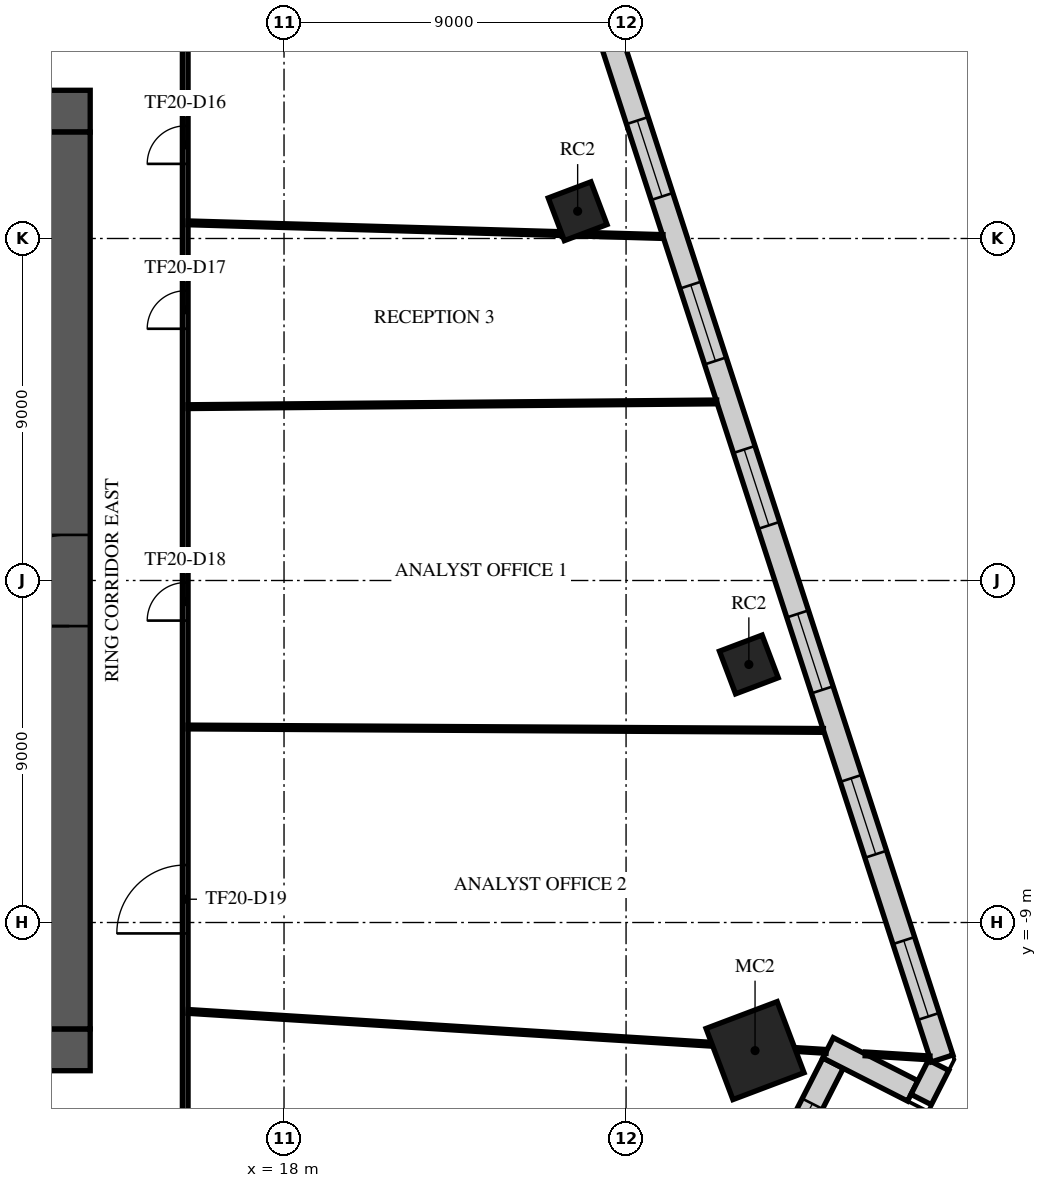
"""IFC4 building model, lengths in metres.
Left out: names, types, materials, properties, quantities, classifications, styles, units other than length and angle.
Written with IfcOpenShell. Run it as: python <this file> out.ifc"""

import sys

from ifc_helpers import new_model, si_unit, direction, frame, frame_2d, origin, origin_2d, place, context, subcontext, project, spatial, rectangle, extrude, element, fill, save


model = new_model("IFC4")
c1 = context("Model", 3, precision=1e-05, world=origin(), true_north=direction((0.0, 1.0)))
c2 = subcontext(c1, "Body", "Model", "MODEL_VIEW")
j1 = project(units=[si_unit("LENGTHUNIT", "METRE"), si_unit("PLANEANGLEUNIT", "RADIAN")], contexts=[c1])
p1 = place(None, origin())
s1 = spatial("IfcSite", under=j1, at=p1, CompositionType="ELEMENT")
p2 = place(p1, origin())
s2 = spatial("IfcBuilding", under=s1, at=p2, CompositionType="ELEMENT")
p3 = place(p2, frame((0.0, 0.0, 90.1)))
s3 = spatial("IfcBuildingStorey", under=s2, at=p3, CompositionType="ELEMENT", Elevation=90.1)
p4 = place(p3, frame((30.394, -12.371, 0.0), z_axis=(0.0, 0.0, 1.0), x_axis=(0.935491525991, 0.353349125935, 0.0)))
e1 = element("IfcColumn", 1, at=p4, inside=s3, PredefinedType="COLUMN", context=c2, shape_type="SweptSolid", body=[
    extrude(rectangle(XDim=2.0, YDim=2.0, at=origin_2d()), origin(), (0.0, 0.0, 1.0), 4.0),
])
for number, where, z_axis, x_axis in (
    (2, (30.231, -2.21, 0.0), (0.0, 0.0, 1.0), (0.935, 0.353, 0.0)),
    (3, (25.726, 9.717, 0.0), (0.0, 0.0, 1.0), (0.935, 0.353, 0.0)),
):
    element("IfcColumn", number, at=place(p3, frame(where, z_axis=z_axis, x_axis=x_axis)), inside=s3, PredefinedType="COLUMN", context=c2, shape_type="SweptSolid", body=[
        extrude(rectangle(XDim=1.2, YDim=1.2, at=origin_2d()), origin(), (0.0, 0.0, 1.0), 4.0),
    ])
p5 = place(p3, frame((-12.9, 12.35, 0.0), z_axis=(0.0, 0.0, 1.0), x_axis=(1.0, 0.0, 0.0)))
e4 = element("IfcWall", 4, at=p5, inside=s3, PredefinedType="SHEAR", context=c2, shape_type="SweptSolid", body=[
    extrude(rectangle(XDim=25.8, YDim=1.1, at=frame_2d((12.9, 0.0))), origin(), (0.0, 0.0, 1.0), 3.58),
])
p6 = place(p5, frame((11.7, 0.0, 0.0)))
e5 = element("IfcOpeningElement", 5, at=p6, cuts=e4, PredefinedType="OPENING", context=c2, shape_type="SweptSolid", body=[
    extrude(rectangle(XDim=2.4, YDim=2.4, at=frame_2d((1.2, 1.2))), frame((0.0, 0.56, 0.0), z_axis=(0.0, -1.0, 0.0), x_axis=(1.0, 0.0, 0.0)), (0.0, 0.0, 1.0), 1.12),
])
p7 = place(p5, frame((22.525, 0.0, 0.0)))
e6 = element("IfcOpeningElement", 6, at=p7, cuts=e4, PredefinedType="OPENING", context=c2, shape_type="SweptSolid", body=[
    extrude(rectangle(XDim=1.2, YDim=2.1, at=frame_2d((0.6, 1.05))), frame((0.0, 0.56, 0.0), z_axis=(0.0, -1.0, 0.0), x_axis=(1.0, 0.0, 0.0)), (0.0, 0.0, 1.0), 1.12),
])
p8 = place(p5, frame((1.5, 0.0, 0.0)))
e7 = element("IfcOpeningElement", 7, at=p8, cuts=e4, PredefinedType="OPENING", context=c2, shape_type="SweptSolid", body=[
    extrude(rectangle(XDim=1.0, YDim=2.1, at=frame_2d((0.5, 1.05))), frame((0.0, 0.56, 0.0), z_axis=(0.0, -1.0, 0.0), x_axis=(1.0, 0.0, 0.0)), (0.0, 0.0, 1.0), 1.12),
])
p9 = place(p3, frame((-12.9, -12.35, 0.0), z_axis=(0.0, 0.0, 1.0), x_axis=(1.0, 0.0, 0.0)))
e8 = element("IfcWall", 8, at=p9, inside=s3, PredefinedType="SHEAR", context=c2, shape_type="SweptSolid", body=[
    extrude(rectangle(XDim=25.8, YDim=1.1, at=frame_2d((12.9, 0.0))), origin(), (0.0, 0.0, 1.0), 3.58),
])
p10 = place(p9, frame((7.8, 0.0, 0.0)))
e9 = element("IfcOpeningElement", 9, at=p10, cuts=e8, PredefinedType="OPENING", context=c2, shape_type="SweptSolid", body=[
    extrude(rectangle(XDim=2.0, YDim=2.1, at=frame_2d((1.0, 1.05))), frame((0.0, 0.56, 0.0), z_axis=(0.0, -1.0, 0.0), x_axis=(1.0, 0.0, 0.0)), (0.0, 0.0, 1.0), 1.12),
])
p11 = place(p9, frame((17.925, 0.0, 0.0)))
e10 = element("IfcOpeningElement", 10, at=p11, cuts=e8, PredefinedType="OPENING", context=c2, shape_type="SweptSolid", body=[
    extrude(rectangle(XDim=1.2, YDim=2.1, at=frame_2d((0.6, 1.05))), frame((0.0, 0.56, 0.0), z_axis=(0.0, -1.0, 0.0), x_axis=(1.0, 0.0, 0.0)), (0.0, 0.0, 1.0), 1.12),
])
p12 = place(p9, frame((2.075, 0.0, 0.0)))
e11 = element("IfcOpeningElement", 11, at=p12, cuts=e8, PredefinedType="OPENING", context=c2, shape_type="SweptSolid", body=[
    extrude(rectangle(XDim=1.2, YDim=2.1, at=frame_2d((0.6, 1.05))), frame((0.0, 0.56, 0.0), z_axis=(0.0, -1.0, 0.0), x_axis=(1.0, 0.0, 0.0)), (0.0, 0.0, 1.0), 1.12),
])
p13 = place(p9, frame((22.525, 0.0, 0.0)))
e12 = element("IfcOpeningElement", 12, at=p13, cuts=e8, PredefinedType="OPENING", context=c2, shape_type="SweptSolid", body=[
    extrude(rectangle(XDim=1.2, YDim=2.1, at=frame_2d((0.6, 1.05))), frame((0.0, 0.56, 0.0), z_axis=(0.0, -1.0, 0.0), x_axis=(1.0, 0.0, 0.0)), (0.0, 0.0, 1.0), 1.12),
])
p14 = place(p3, frame((12.35, -11.8, 0.0), z_axis=(0.0, 0.0, 1.0), x_axis=(0.0, 1.0, 0.0)))
e13 = element("IfcWall", 13, at=p14, inside=s3, PredefinedType="SHEAR", context=c2, shape_type="SweptSolid", body=[
    extrude(rectangle(XDim=23.6, YDim=1.1, at=frame_2d((11.8, 0.0))), origin(), (0.0, 0.0, 1.0), 3.58),
])
p15 = place(p14, frame((10.6, 0.0, 0.0)))
e14 = element("IfcOpeningElement", 14, at=p15, cuts=e13, PredefinedType="OPENING", context=c2, shape_type="SweptSolid", body=[
    extrude(rectangle(XDim=2.4, YDim=2.4, at=frame_2d((1.2, 1.2))), frame((0.0, 0.56, 0.0), z_axis=(0.0, -1.0, 0.0), x_axis=(1.0, 0.0, 0.0)), (0.0, 0.0, 1.0), 1.12),
])
p16 = place(p3, frame((30.631, -16.265, 0.0), z_axis=(0.0, 0.0, 1.0), x_axis=(0.454011719911, 0.890995711653, 0.0)))
e15 = element("IfcWall", 15, at=p16, inside=s3, PredefinedType="STANDARD", context=c2, shape_type="SweptSolid", body=[
    extrude(rectangle(XDim=4.0, YDim=0.6, at=frame_2d((2.0, 0.0))), origin(), (0.0, 0.0, 1.0), 3.58),
])
p17 = place(p16, frame((1.2, 0.0, 0.9)))
e16 = element("IfcOpeningElement", 16, at=p17, cuts=e15, PredefinedType="OPENING", context=c2, shape_type="SweptSolid", body=[
    extrude(rectangle(XDim=1.6, YDim=2.1, at=frame_2d((0.8, 1.05))), frame((0.0, 0.31, 0.0), z_axis=(0.0, -1.0, 0.0), x_axis=(1.0, 0.0, 0.0)), (0.0, 0.0, 1.0), 0.62),
])
p18 = place(p3, frame((32.316, -12.297, 0.0), z_axis=(0.0, 0.0, 1.0), x_axis=(0.891023102287, -0.453957961921, 0.0)))
e17 = element("IfcWall", 17, at=p18, inside=s3, PredefinedType="STANDARD", context=c2, shape_type="SweptSolid", body=[
    extrude(rectangle(XDim=2.5, YDim=0.6, at=frame_2d((1.25, 0.0))), origin(), (0.0, 0.0, 1.0), 3.58),
])
p19 = place(p3, frame((34.765, -13.658, 0.0), z_axis=(0.0, 0.0, 1.0), x_axis=(0.454055955632, 0.890973169717, 0.0)))
e18 = element("IfcWall", 18, at=p19, inside=s3, PredefinedType="STANDARD", context=c2, shape_type="SweptSolid", body=[
    extrude(rectangle(XDim=1.011, YDim=0.6, at=frame_2d((0.506, 0.0))), origin(), (0.0, 0.0, 1.0), 3.58),
])
p20 = place(p3, frame((35.315, -12.578, 0.0), z_axis=(0.0, 0.0, 1.0), x_axis=(-0.30901806374, 0.951056168837, 0.0)))
e19 = element("IfcWall", 19, at=p20, inside=s3, PredefinedType="STANDARD", context=c2, shape_type="SweptSolid", body=[
    extrude(rectangle(XDim=45.376, YDim=0.6, at=frame_2d((22.688, 0.0))), origin(), (0.0, 0.0, 1.0), 3.58),
])
p21 = place(p20, frame((1.163, 0.0, 0.9)))
e20 = element("IfcOpeningElement", 20, at=p21, cuts=e19, PredefinedType="OPENING", context=c2, shape_type="SweptSolid", body=[
    extrude(rectangle(XDim=2.1, YDim=2.1, at=frame_2d((1.05, 1.05))), frame((0.0, 0.31, 0.0), z_axis=(0.0, -1.0, 0.0), x_axis=(1.0, 0.0, 0.0)), (0.0, 0.0, 1.0), 0.62),
])
p22 = place(p20, frame((5.651, 0.0, 0.9)))
e21 = element("IfcOpeningElement", 21, at=p22, cuts=e19, PredefinedType="OPENING", context=c2, shape_type="SweptSolid", body=[
    extrude(rectangle(XDim=2.1, YDim=2.1, at=frame_2d((1.05, 1.05))), frame((0.0, 0.31, 0.0), z_axis=(0.0, -1.0, 0.0), x_axis=(1.0, 0.0, 0.0)), (0.0, 0.0, 1.0), 0.62),
])
p23 = place(p20, frame((10.201, 0.0, 0.9)))
e22 = element("IfcOpeningElement", 22, at=p23, cuts=e19, PredefinedType="OPENING", context=c2, shape_type="SweptSolid", body=[
    extrude(rectangle(XDim=2.1, YDim=2.1, at=frame_2d((1.05, 1.05))), frame((0.0, 0.31, 0.0), z_axis=(0.0, -1.0, 0.0), x_axis=(1.0, 0.0, 0.0)), (0.0, 0.0, 1.0), 0.62),
])
p24 = place(p20, frame((14.751, 0.0, 0.9)))
e23 = element("IfcOpeningElement", 23, at=p24, cuts=e19, PredefinedType="OPENING", context=c2, shape_type="SweptSolid", body=[
    extrude(rectangle(XDim=2.1, YDim=2.1, at=frame_2d((1.05, 1.05))), frame((0.0, 0.31, 0.0), z_axis=(0.0, -1.0, 0.0), x_axis=(1.0, 0.0, 0.0)), (0.0, 0.0, 1.0), 0.62),
])
p25 = place(p20, frame((19.301, 0.0, 0.9)))
e24 = element("IfcOpeningElement", 24, at=p25, cuts=e19, PredefinedType="OPENING", context=c2, shape_type="SweptSolid", body=[
    extrude(rectangle(XDim=2.1, YDim=2.1, at=frame_2d((1.05, 1.05))), frame((0.0, 0.31, 0.0), z_axis=(0.0, -1.0, 0.0), x_axis=(1.0, 0.0, 0.0)), (0.0, 0.0, 1.0), 0.62),
])
p26 = place(p20, frame((23.851, 0.0, 0.9)))
e25 = element("IfcOpeningElement", 25, at=p26, cuts=e19, PredefinedType="OPENING", context=c2, shape_type="SweptSolid", body=[
    extrude(rectangle(XDim=2.1, YDim=2.1, at=frame_2d((1.05, 1.05))), frame((0.0, 0.31, 0.0), z_axis=(0.0, -1.0, 0.0), x_axis=(1.0, 0.0, 0.0)), (0.0, 0.0, 1.0), 0.62),
])
p27 = place(p20, frame((28.401, 0.0, 0.9)))
e26 = element("IfcOpeningElement", 26, at=p27, cuts=e19, PredefinedType="OPENING", context=c2, shape_type="SweptSolid", body=[
    extrude(rectangle(XDim=2.1, YDim=2.1, at=frame_2d((1.05, 1.05))), frame((0.0, 0.31, 0.0), z_axis=(0.0, -1.0, 0.0), x_axis=(1.0, 0.0, 0.0)), (0.0, 0.0, 1.0), 0.62),
])
p28 = place(p20, frame((32.951, 0.0, 0.9)))
e27 = element("IfcOpeningElement", 27, at=p28, cuts=e19, PredefinedType="OPENING", context=c2, shape_type="SweptSolid", body=[
    extrude(rectangle(XDim=2.1, YDim=2.1, at=frame_2d((1.05, 1.05))), frame((0.0, 0.31, 0.0), z_axis=(0.0, -1.0, 0.0), x_axis=(1.0, 0.0, 0.0)), (0.0, 0.0, 1.0), 0.62),
])
p29 = place(p20, frame((37.501, 0.0, 0.9)))
e28 = element("IfcOpeningElement", 28, at=p29, cuts=e19, PredefinedType="OPENING", context=c2, shape_type="SweptSolid", body=[
    extrude(rectangle(XDim=2.1, YDim=2.1, at=frame_2d((1.05, 1.05))), frame((0.0, 0.31, 0.0), z_axis=(0.0, -1.0, 0.0), x_axis=(1.0, 0.0, 0.0)), (0.0, 0.0, 1.0), 0.62),
])
p30 = place(p20, frame((42.051, 0.0, 0.9)))
e29 = element("IfcOpeningElement", 29, at=p30, cuts=e19, PredefinedType="OPENING", context=c2, shape_type="SweptSolid", body=[
    extrude(rectangle(XDim=2.1, YDim=2.1, at=frame_2d((1.05, 1.05))), frame((0.0, 0.31, 0.0), z_axis=(0.0, -1.0, 0.0), x_axis=(1.0, 0.0, 0.0)), (0.0, 0.0, 1.0), 0.62),
])
p31 = place(p3, frame((15.4, -15.325, 0.0), z_axis=(0.0, 0.0, 1.0), x_axis=(0.0, 1.0, 0.0)))
e30 = element("IfcWall", 30, at=p31, inside=s3, PredefinedType="PARTITIONING", context=c2, shape_type="SweptSolid", body=[
    extrude(rectangle(XDim=30.65, YDim=0.15, at=frame_2d((15.325, 0.0))), origin(), (0.0, 0.0, 1.0), 3.08),
])
p32 = place(p31, frame((26.288, 0.0, 0.0)))
e31 = element("IfcOpeningElement", 31, at=p32, cuts=e30, PredefinedType="OPENING", context=c2, shape_type="SweptSolid", body=[
    extrude(rectangle(XDim=1.0, YDim=2.1, at=frame_2d((0.5, 1.05))), frame((0.0, 0.085, 0.0), z_axis=(0.0, -1.0, 0.0), x_axis=(1.0, 0.0, 0.0)), (0.0, 0.0, 1.0), 0.17),
])
p33 = place(p31, frame((21.949, 0.0, 0.0)))
e32 = element("IfcOpeningElement", 32, at=p33, cuts=e30, PredefinedType="OPENING", context=c2, shape_type="SweptSolid", body=[
    extrude(rectangle(XDim=1.0, YDim=2.1, at=frame_2d((0.5, 1.05))), frame((0.0, 0.085, 0.0), z_axis=(0.0, -1.0, 0.0), x_axis=(1.0, 0.0, 0.0)), (0.0, 0.0, 1.0), 0.17),
])
p34 = place(p31, frame((14.27, 0.0, 0.0)))
e33 = element("IfcOpeningElement", 33, at=p34, cuts=e30, PredefinedType="OPENING", context=c2, shape_type="SweptSolid", body=[
    extrude(rectangle(XDim=1.0, YDim=2.1, at=frame_2d((0.5, 1.05))), frame((0.0, 0.085, 0.0), z_axis=(0.0, -1.0, 0.0), x_axis=(1.0, 0.0, 0.0)), (0.0, 0.0, 1.0), 0.17),
])
p35 = place(p31, frame((6.038, 0.0, 0.0)))
e34 = element("IfcOpeningElement", 34, at=p35, cuts=e30, PredefinedType="OPENING", context=c2, shape_type="SweptSolid", body=[
    extrude(rectangle(XDim=1.8, YDim=2.1, at=frame_2d((0.9, 1.05))), frame((0.0, 0.085, 0.0), z_axis=(0.0, -1.0, 0.0), x_axis=(1.0, 0.0, 0.0)), (0.0, 0.0, 1.0), 0.17),
])
p36 = place(p3, frame((15.478, -11.34, 0.0), z_axis=(0.0, 0.0, 1.0), x_axis=(0.998040108865, -0.062577480745, 0.0)))
e35 = element("IfcWall", 35, at=p36, inside=s3, PredefinedType="PARTITIONING", context=c2, shape_type="SweptSolid", body=[
    extrude(rectangle(XDim=13.811, YDim=0.1, at=frame_2d((6.906, 0.0))), origin(), (0.0, 0.0, 1.0), 2.96),
])
p37 = place(p3, frame((15.475, -3.855, 0.0), z_axis=(0.0, 0.0, 1.0), x_axis=(0.999985480582, -0.005388749797, 0.0)))
e36 = element("IfcWall", 36, at=p37, inside=s3, PredefinedType="PARTITIONING", context=c2, shape_type="SweptSolid", body=[
    extrude(rectangle(XDim=16.718, YDim=0.1, at=frame_2d((8.359, 0.0))), origin(), (0.0, 0.0, 1.0), 2.83),
])
p38 = place(p3, frame((15.475, 4.575, 0.0), z_axis=(0.0, 0.0, 1.0), x_axis=(0.99995993254, 0.008951721355, 0.0)))
e37 = element("IfcWall", 37, at=p38, inside=s3, PredefinedType="PARTITIONING", context=c2, shape_type="SweptSolid", body=[
    extrude(rectangle(XDim=13.909, YDim=0.1, at=frame_2d((6.955, 0.0))), origin(), (0.0, 0.0, 1.0), 2.83),
])
p39 = place(p3, frame((15.476, 9.412, 0.0), z_axis=(0.0, 0.0, 1.0), x_axis=(0.999583865111, -0.028846084817, 0.0)))
e38 = element("IfcWall", 38, at=p39, inside=s3, PredefinedType="PARTITIONING", context=c2, shape_type="SweptSolid", body=[
    extrude(rectangle(XDim=9.835, YDim=0.1, at=frame_2d((4.917, 0.0))), origin(), (0.0, 0.0, 1.0), 2.96),
])
p40 = place(p3, frame((25.826, 9.113, 0.0), z_axis=(0.0, 0.0, 1.0), x_axis=(0.999585375356, -0.028793703742, 0.0)))
e39 = element("IfcWall", 39, at=p40, inside=s3, PredefinedType="PARTITIONING", context=c2, shape_type="SweptSolid", body=[
    extrude(rectangle(XDim=2.145, YDim=0.1, at=frame_2d((1.073, 0.0))), origin(), (0.0, 0.0, 1.0), 2.83),
])
p41 = place(p3, frame((31.452, -12.342, 0.0), z_axis=(0.0, 0.0, 1.0), x_axis=(0.998038567495, -0.062602059006, 0.0)))
e40 = element("IfcWall", 40, at=p41, inside=s3, PredefinedType="PARTITIONING", context=c2, shape_type="SweptSolid", body=[
    extrude(rectangle(XDim=0.815, YDim=0.1, at=frame_2d((0.408, 0.0))), origin(), (0.0, 0.0, 1.0), 3.58),
])
p42 = place(p3, frame((33.295, -12.457, 0.0), z_axis=(0.0, 0.0, 1.0), x_axis=(0.998041396796, -0.062556936314, 0.0)))
e41 = element("IfcWall", 41, at=p42, inside=s3, PredefinedType="PARTITIONING", context=c2, shape_type="SweptSolid", body=[
    extrude(rectangle(XDim=1.702, YDim=0.1, at=frame_2d((0.851, 0.0))), origin(), (0.0, 0.0, 1.0), 3.58),
])
p43 = place(p15, origin())
e42 = element("IfcDoor", 42, at=p43, inside=s3, OperationType="SINGLE_SWING_LEFT", PredefinedType="DOOR", context=c2, shape_type="SweptSolid", body=[
    extrude(rectangle(XDim=2.4, YDim=2.4, at=frame_2d((1.2, 1.2))), frame((0.0, 0.025, 0.0), z_axis=(0.0, -1.0, 0.0), x_axis=(1.0, 0.0, 0.0)), (0.0, 0.0, 1.0), 0.05),
])
fill(e14, e42)
p44 = place(p17, origin())
e43 = element("IfcWindow", 43, at=p44, inside=s3, PartitioningType="SINGLE_PANEL", PredefinedType="WINDOW", context=c2, shape_type="SweptSolid", body=[
    extrude(rectangle(XDim=1.6, YDim=2.1, at=frame_2d((0.8, 1.05))), frame((0.0, 0.03, 0.0), z_axis=(0.0, -1.0, 0.0), x_axis=(1.0, 0.0, 0.0)), (0.0, 0.0, 1.0), 0.06),
])
fill(e16, e43)
p45 = place(p21, origin())
e44 = element("IfcWindow", 44, at=p45, inside=s3, PartitioningType="SINGLE_PANEL", PredefinedType="WINDOW", context=c2, shape_type="SweptSolid", body=[
    extrude(rectangle(XDim=2.1, YDim=2.1, at=frame_2d((1.05, 1.05))), frame((0.0, 0.03, 0.0), z_axis=(0.0, -1.0, 0.0), x_axis=(1.0, 0.0, 0.0)), (0.0, 0.0, 1.0), 0.06),
])
fill(e20, e44)
p46 = place(p22, origin())
e45 = element("IfcWindow", 45, at=p46, inside=s3, PartitioningType="SINGLE_PANEL", PredefinedType="WINDOW", context=c2, shape_type="SweptSolid", body=[
    extrude(rectangle(XDim=2.1, YDim=2.1, at=frame_2d((1.05, 1.05))), frame((0.0, 0.03, 0.0), z_axis=(0.0, -1.0, 0.0), x_axis=(1.0, 0.0, 0.0)), (0.0, 0.0, 1.0), 0.06),
])
fill(e21, e45)
p47 = place(p23, origin())
e46 = element("IfcWindow", 46, at=p47, inside=s3, PartitioningType="SINGLE_PANEL", PredefinedType="WINDOW", context=c2, shape_type="SweptSolid", body=[
    extrude(rectangle(XDim=2.1, YDim=2.1, at=frame_2d((1.05, 1.05))), frame((0.0, 0.03, 0.0), z_axis=(0.0, -1.0, 0.0), x_axis=(1.0, 0.0, 0.0)), (0.0, 0.0, 1.0), 0.06),
])
fill(e22, e46)
p48 = place(p24, origin())
e47 = element("IfcWindow", 47, at=p48, inside=s3, PartitioningType="SINGLE_PANEL", PredefinedType="WINDOW", context=c2, shape_type="SweptSolid", body=[
    extrude(rectangle(XDim=2.1, YDim=2.1, at=frame_2d((1.05, 1.05))), frame((0.0, 0.03, 0.0), z_axis=(0.0, -1.0, 0.0), x_axis=(1.0, 0.0, 0.0)), (0.0, 0.0, 1.0), 0.06),
])
fill(e23, e47)
p49 = place(p25, origin())
e48 = element("IfcWindow", 48, at=p49, inside=s3, PartitioningType="SINGLE_PANEL", PredefinedType="WINDOW", context=c2, shape_type="SweptSolid", body=[
    extrude(rectangle(XDim=2.1, YDim=2.1, at=frame_2d((1.05, 1.05))), frame((0.0, 0.03, 0.0), z_axis=(0.0, -1.0, 0.0), x_axis=(1.0, 0.0, 0.0)), (0.0, 0.0, 1.0), 0.06),
])
fill(e24, e48)
p50 = place(p26, origin())
e49 = element("IfcWindow", 49, at=p50, inside=s3, PartitioningType="SINGLE_PANEL", PredefinedType="WINDOW", context=c2, shape_type="SweptSolid", body=[
    extrude(rectangle(XDim=2.1, YDim=2.1, at=frame_2d((1.05, 1.05))), frame((0.0, 0.03, 0.0), z_axis=(0.0, -1.0, 0.0), x_axis=(1.0, 0.0, 0.0)), (0.0, 0.0, 1.0), 0.06),
])
fill(e25, e49)
p51 = place(p32, frame((1.0, 0.0, 0.0), z_axis=(0.0, 0.0, 1.0), x_axis=(-1.0, 0.0, 0.0)))
e50 = element("IfcDoor", 50, at=p51, inside=s3, OperationType="SINGLE_SWING_RIGHT", PredefinedType="DOOR", context=c2, shape_type="SweptSolid", body=[
    extrude(rectangle(XDim=1.0, YDim=2.1, at=frame_2d((0.5, 1.05))), frame((0.0, 0.025, 0.0), z_axis=(0.0, -1.0, 0.0), x_axis=(1.0, 0.0, 0.0)), (0.0, 0.0, 1.0), 0.05),
])
fill(e31, e50)
p52 = place(p33, frame((1.0, 0.0, 0.0), z_axis=(0.0, 0.0, 1.0), x_axis=(-1.0, 0.0, 0.0)))
e51 = element("IfcDoor", 51, at=p52, inside=s3, OperationType="SINGLE_SWING_RIGHT", PredefinedType="DOOR", context=c2, shape_type="SweptSolid", body=[
    extrude(rectangle(XDim=1.0, YDim=2.1, at=frame_2d((0.5, 1.05))), frame((0.0, 0.025, 0.0), z_axis=(0.0, -1.0, 0.0), x_axis=(1.0, 0.0, 0.0)), (0.0, 0.0, 1.0), 0.05),
])
fill(e32, e51)
p53 = place(p34, frame((1.0, 0.0, 0.0), z_axis=(0.0, 0.0, 1.0), x_axis=(-1.0, 0.0, 0.0)))
e52 = element("IfcDoor", 52, at=p53, inside=s3, OperationType="SINGLE_SWING_RIGHT", PredefinedType="DOOR", context=c2, shape_type="SweptSolid", body=[
    extrude(rectangle(XDim=1.0, YDim=2.1, at=frame_2d((0.5, 1.05))), frame((0.0, 0.025, 0.0), z_axis=(0.0, -1.0, 0.0), x_axis=(1.0, 0.0, 0.0)), (0.0, 0.0, 1.0), 0.05),
])
fill(e33, e52)
p54 = place(p35, frame((1.8, 0.0, 0.0), z_axis=(0.0, 0.0, 1.0), x_axis=(-1.0, 0.0, 0.0)))
e53 = element("IfcDoor", 53, at=p54, inside=s3, OperationType="DOUBLE_DOOR_SINGLE_SWING", PredefinedType="DOOR", context=c2, shape_type="SweptSolid", body=[
    extrude(rectangle(XDim=1.8, YDim=2.1, at=frame_2d((0.9, 1.05))), frame((0.0, 0.025, 0.0), z_axis=(0.0, -1.0, 0.0), x_axis=(1.0, 0.0, 0.0)), (0.0, 0.0, 1.0), 0.05),
])
fill(e34, e53)
save(model, sys.argv[1])
